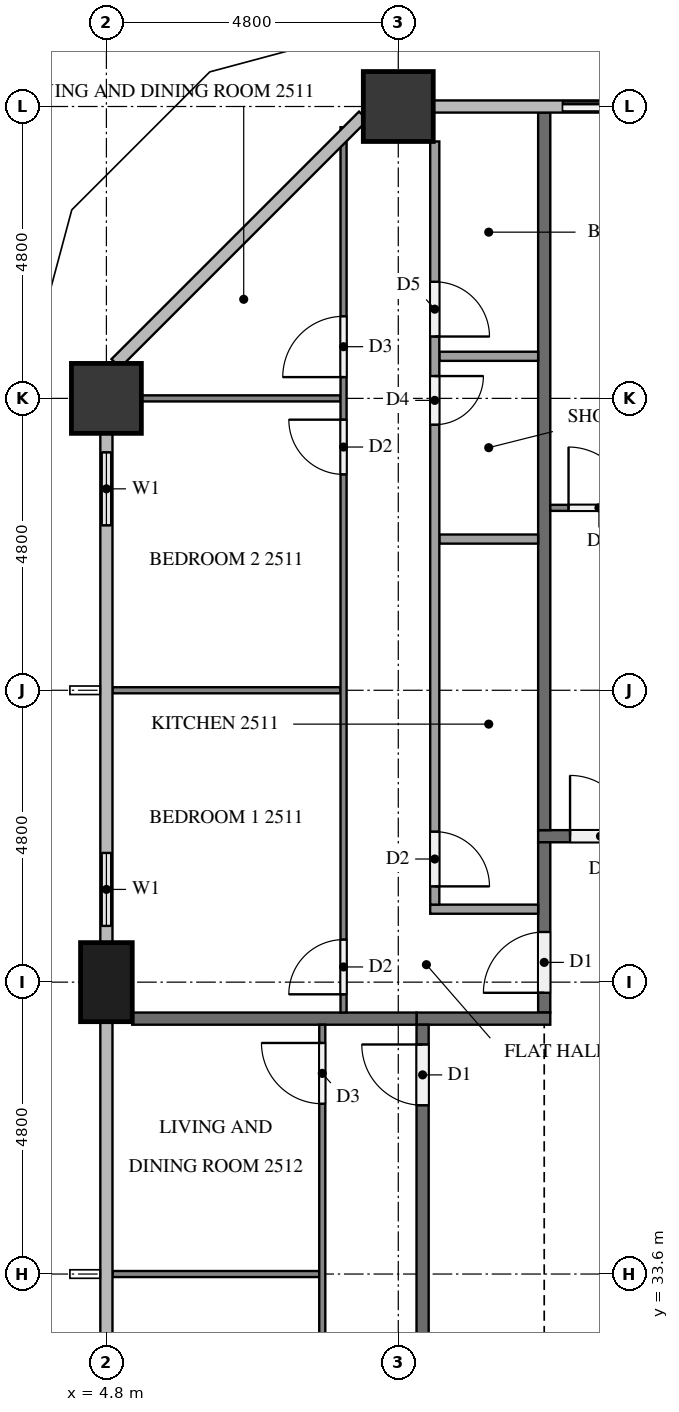
"""IFC4 building model, lengths in metres.
Left out: names, types, materials, properties, quantities, classifications, styles, units other than length and angle.
Written with IfcOpenShell. Run it as: python <this file> out.ifc"""

import sys

from ifc_helpers import new_model, si_unit, direction, frame, frame_2d, origin, origin_2d, place, context, subcontext, project, spatial, rectangle, extrude, element, fill, save


model = new_model("IFC4")
c1 = context("Model", 3, precision=1e-05, world=origin(), true_north=direction((0.0, 1.0)))
c2 = subcontext(c1, "Body", "Model", "MODEL_VIEW")
j1 = project(units=[si_unit("LENGTHUNIT", "METRE"), si_unit("PLANEANGLEUNIT", "RADIAN")], contexts=[c1])
p1 = place(None, origin())
s1 = spatial("IfcSite", under=j1, at=p1, CompositionType="ELEMENT")
p2 = place(p1, origin())
s2 = spatial("IfcBuilding", under=s1, at=p2, CompositionType="ELEMENT")
p3 = place(p2, frame((0.0, 0.0, 99.7)))
s3 = spatial("IfcBuildingStorey", under=s2, at=p3, CompositionType="ELEMENT", Elevation=99.7)
for number, where, z_axis, x_axis in (
    (1, (9.6, 52.8, 0.0), (0.0, 0.0, 1.0), (1.0, 0.0, 0.0)),
    (2, (4.8, 48.0, 0.0), (0.0, 0.0, 1.0), (1.0, 0.0, 0.0)),
):
    element("IfcColumn", number, at=place(p3, frame(where, z_axis=z_axis, x_axis=x_axis)), inside=s3, PredefinedType="COLUMN", context=c2, shape_type="SweptSolid", body=[
        extrude(rectangle(XDim=1.15, YDim=1.15, at=origin_2d()), origin(), (0.0, 0.0, 1.0), 3.2),
    ])
p4 = place(p3, frame((4.8, 38.4, 0.0), z_axis=(0.0, 0.0, 1.0), x_axis=(0.0, 1.0, 0.0)))
e3 = element("IfcColumn", 3, at=p4, inside=s3, PredefinedType="COLUMN", context=c2, shape_type="SweptSolid", body=[
    extrude(rectangle(XDim=1.3, YDim=0.85, at=origin_2d()), origin(), (0.0, 0.0, 1.0), 3.2),
])
p5 = place(p3, frame((14.4, 52.8, 0.0), z_axis=(0.0, 0.0, 1.0), x_axis=(-1.0, 0.0, 0.0)))
e4 = element("IfcWall", 4, at=p5, inside=s3, PredefinedType="SOLIDWALL", context=c2, shape_type="SweptSolid", body=[
    extrude(rectangle(XDim=2.4, YDim=0.15, at=frame_2d((1.2, 0.0))), origin(), (0.0, 0.0, 1.0), 3.2),
])
p6 = place(p5, frame((0.3, 0.0, 0.0)))
e5 = element("IfcOpeningElement", 5, at=p6, cuts=e4, PredefinedType="OPENING", context=c2, shape_type="SweptSolid", body=[
    extrude(rectangle(XDim=1.8, YDim=2.4, at=frame_2d((0.9, 1.2))), frame((0.0, 0.085, 0.0), z_axis=(0.0, -1.0, 0.0), x_axis=(1.0, 0.0, 0.0)), (0.0, 0.0, 1.0), 0.17),
])
p7 = place(p3, frame((4.8, 47.425, 0.0), z_axis=(0.0, 0.0, 1.0), x_axis=(0.0, -1.0, 0.0)))
e6 = element("IfcWall", 6, at=p7, inside=s3, PredefinedType="SOLIDWALL", context=c2, shape_type="SweptSolid", body=[
    extrude(rectangle(XDim=1.825, YDim=0.15, at=frame_2d((0.913, 0.0))), origin(), (0.0, 0.0, 1.0), 3.2),
])
p8 = place(p7, frame((0.312, 0.0, 0.9)))
e7 = element("IfcOpeningElement", 7, at=p8, cuts=e6, PredefinedType="OPENING", context=c2, shape_type="SweptSolid", body=[
    extrude(rectangle(XDim=1.2, YDim=1.4, at=frame_2d((0.6, 0.7))), frame((0.0, 0.085, 0.0), z_axis=(0.0, -1.0, 0.0), x_axis=(1.0, 0.0, 0.0)), (0.0, 0.0, 1.0), 0.17),
])
p9 = place(p3, frame((4.8, 40.8, 0.0), z_axis=(0.0, 0.0, 1.0), x_axis=(0.0, -1.0, 0.0)))
e8 = element("IfcWall", 8, at=p9, inside=s3, PredefinedType="SOLIDWALL", context=c2, shape_type="SweptSolid", body=[
    extrude(rectangle(XDim=1.75, YDim=0.15, at=frame_2d((0.875, 0.0))), origin(), (0.0, 0.0, 1.0), 3.2),
])
p10 = place(p9, frame((0.275, 0.0, 0.9)))
e9 = element("IfcOpeningElement", 9, at=p10, cuts=e8, PredefinedType="OPENING", context=c2, shape_type="SweptSolid", body=[
    extrude(rectangle(XDim=1.2, YDim=1.4, at=frame_2d((0.6, 0.7))), frame((0.0, 0.085, 0.0), z_axis=(0.0, -1.0, 0.0), x_axis=(1.0, 0.0, 0.0)), (0.0, 0.0, 1.0), 0.17),
])
p11 = place(p3, frame((11.9, 40.8, 0.0), z_axis=(0.0, 0.0, 1.0), x_axis=(1.0, 0.0, 0.0)))
e10 = element("IfcWall", 10, at=p11, inside=s3, PredefinedType="PARTITIONING", context=c2, shape_type="SweptSolid", body=[
    extrude(rectangle(XDim=38.6, YDim=0.2, at=frame_2d((19.3, 0.0))), origin(), (0.0, 0.0, 1.0), 3.2),
])
p12 = place(p11, frame((22.125, 0.0, 0.0)))
e11 = element("IfcOpeningElement", 11, at=p12, cuts=e10, PredefinedType="OPENING", context=c2, shape_type="SweptSolid", body=[
    extrude(rectangle(XDim=1.0, YDim=2.1, at=frame_2d((0.5, 1.05))), frame((0.0, 0.11, 0.0), z_axis=(0.0, -1.0, 0.0), x_axis=(1.0, 0.0, 0.0)), (0.0, 0.0, 1.0), 0.22),
])
p13 = place(p11, frame((20.275, 0.0, 0.0)))
e12 = element("IfcOpeningElement", 12, at=p13, cuts=e10, PredefinedType="OPENING", context=c2, shape_type="SweptSolid", body=[
    extrude(rectangle(XDim=1.0, YDim=2.1, at=frame_2d((0.5, 1.05))), frame((0.0, 0.11, 0.0), z_axis=(0.0, -1.0, 0.0), x_axis=(1.0, 0.0, 0.0)), (0.0, 0.0, 1.0), 0.22),
])
p14 = place(p11, frame((0.525, 0.0, 0.0)))
e13 = element("IfcOpeningElement", 13, at=p14, cuts=e10, PredefinedType="OPENING", context=c2, shape_type="SweptSolid", body=[
    extrude(rectangle(XDim=1.0, YDim=2.1, at=frame_2d((0.5, 1.05))), frame((0.0, 0.11, 0.0), z_axis=(0.0, -1.0, 0.0), x_axis=(1.0, 0.0, 0.0)), (0.0, 0.0, 1.0), 0.22),
])
p15 = place(p3, frame((12.0, 37.9, 0.0), z_axis=(0.0, 0.0, 1.0), x_axis=(0.0, 1.0, 0.0)))
e14 = element("IfcWall", 14, at=p15, inside=s3, PredefinedType="PARTITIONING", context=c2, shape_type="SweptSolid", body=[
    extrude(rectangle(XDim=2.8, YDim=0.2, at=frame_2d((1.4, 0.0))), origin(), (0.0, 0.0, 1.0), 3.2),
])
p16 = place(p15, frame((0.325, 0.0, 0.0)))
e15 = element("IfcOpeningElement", 15, at=p16, cuts=e14, PredefinedType="OPENING", context=c2, shape_type="SweptSolid", body=[
    extrude(rectangle(XDim=1.0, YDim=2.1, at=frame_2d((0.5, 1.05))), frame((0.0, 0.11, 0.0), z_axis=(0.0, -1.0, 0.0), x_axis=(1.0, 0.0, 0.0)), (0.0, 0.0, 1.0), 0.22),
])
p17 = place(p3, frame((12.1, 37.8, 0.0), z_axis=(0.0, 0.0, 1.0), x_axis=(-1.0, 0.0, 0.0)))
e16 = element("IfcWall", 16, at=p17, inside=s3, PredefinedType="PARTITIONING", context=c2, shape_type="SweptSolid", body=[
    extrude(rectangle(XDim=2.2, YDim=0.2, at=frame_2d((1.1, 0.0))), origin(), (0.0, 0.0, 1.0), 3.2),
])
p18 = place(p3, frame((10.0, 15.1, 0.0), z_axis=(0.0, 0.0, 1.0), x_axis=(0.0, 1.0, 0.0)))
e17 = element("IfcWall", 17, at=p18, inside=s3, PredefinedType="PARTITIONING", context=c2, shape_type="SweptSolid", body=[
    extrude(rectangle(XDim=22.6, YDim=0.2, at=frame_2d((11.3, 0.0))), origin(), (0.0, 0.0, 1.0), 3.2),
])
p19 = place(p18, frame((21.275, 0.0, 0.0)))
e18 = element("IfcOpeningElement", 18, at=p19, cuts=e17, PredefinedType="OPENING", context=c2, shape_type="SweptSolid", body=[
    extrude(rectangle(XDim=1.0, YDim=2.1, at=frame_2d((0.5, 1.05))), frame((0.0, 0.11, 0.0), z_axis=(0.0, -1.0, 0.0), x_axis=(1.0, 0.0, 0.0)), (0.0, 0.0, 1.0), 0.22),
])
p20 = place(p18, frame((7.475, 0.0, 0.0)))
e19 = element("IfcOpeningElement", 19, at=p20, cuts=e17, PredefinedType="OPENING", context=c2, shape_type="SweptSolid", body=[
    extrude(rectangle(XDim=1.0, YDim=2.1, at=frame_2d((0.5, 1.05))), frame((0.0, 0.11, 0.0), z_axis=(0.0, -1.0, 0.0), x_axis=(1.0, 0.0, 0.0)), (0.0, 0.0, 1.0), 0.22),
])
p21 = place(p3, frame((12.0, 52.7, 0.0), z_axis=(0.0, 0.0, 1.0), x_axis=(0.0, -1.0, 0.0)))
e20 = element("IfcWall", 20, at=p21, inside=s3, PredefinedType="PARTITIONING", context=c2, shape_type="SweptSolid", body=[
    extrude(rectangle(XDim=11.8, YDim=0.2, at=frame_2d((5.9, 0.0))), origin(), (0.0, 0.0, 1.0), 3.2),
])
p22 = place(p3, frame((5.225, 37.8, 0.0), z_axis=(0.0, 0.0, 1.0), x_axis=(1.0, 0.0, 0.0)))
e21 = element("IfcWall", 21, at=p22, inside=s3, PredefinedType="PARTITIONING", context=c2, shape_type="SweptSolid", body=[
    extrude(rectangle(XDim=4.675, YDim=0.2, at=frame_2d((2.337, 0.0))), origin(), (0.0, 0.0, 1.0), 3.2),
])
p23 = place(p3, frame((12.1, 46.2, 0.0), z_axis=(0.0, 0.0, 1.0), x_axis=(1.0, 0.0, 0.0)))
e22 = element("IfcWall", 22, at=p23, inside=s3, PredefinedType="PARTITIONING", context=c2, shape_type="SweptSolid", body=[
    extrude(rectangle(XDim=9.4, YDim=0.1, at=frame_2d((4.7, 0.0))), origin(), (0.0, 0.0, 1.0), 3.2),
])
p24 = place(p23, frame((0.3, 0.0, 0.0)))
e23 = element("IfcOpeningElement", 23, at=p24, cuts=e22, PredefinedType="OPENING", context=c2, shape_type="SweptSolid", body=[
    extrude(rectangle(XDim=1.0, YDim=2.1, at=frame_2d((0.5, 1.05))), frame((0.0, 0.06, 0.0), z_axis=(0.0, -1.0, 0.0), x_axis=(1.0, 0.0, 0.0)), (0.0, 0.0, 1.0), 0.12),
])
p25 = place(p23, frame((8.2, 0.0, 0.0)))
e24 = element("IfcOpeningElement", 24, at=p25, cuts=e22, PredefinedType="OPENING", context=c2, shape_type="SweptSolid", body=[
    extrude(rectangle(XDim=0.9, YDim=2.1, at=frame_2d((0.45, 1.05))), frame((0.0, 0.06, 0.0), z_axis=(0.0, -1.0, 0.0), x_axis=(1.0, 0.0, 0.0)), (0.0, 0.0, 1.0), 0.12),
])
p26 = place(p3, frame((8.65, 43.2, 0.0), z_axis=(0.0, 0.0, 1.0), x_axis=(-1.0, 0.0, 0.0)))
e25 = element("IfcWall", 25, at=p26, inside=s3, PredefinedType="PARTITIONING", context=c2, shape_type="SweptSolid", body=[
    extrude(rectangle(XDim=3.75, YDim=0.1, at=frame_2d((1.875, 0.0))), origin(), (0.0, 0.0, 1.0), 3.2),
])
p27 = place(p3, frame((8.65, 48.0, 0.0), z_axis=(0.0, 0.0, 1.0), x_axis=(-1.0, 0.0, 0.0)))
e26 = element("IfcWall", 26, at=p27, inside=s3, PredefinedType="PARTITIONING", context=c2, shape_type="SweptSolid", body=[
    extrude(rectangle(XDim=3.275, YDim=0.1, at=frame_2d((1.637, 0.0))), origin(), (0.0, 0.0, 1.0), 3.2),
])
p28 = place(p3, frame((8.7, 37.9, 0.0), z_axis=(0.0, 0.0, 1.0), x_axis=(0.0, 1.0, 0.0)))
e27 = element("IfcWall", 27, at=p28, inside=s3, PredefinedType="PARTITIONING", context=c2, shape_type="SweptSolid", body=[
    extrude(rectangle(XDim=14.559, YDim=0.1, at=frame_2d((7.279, 0.0))), origin(), (0.0, 0.0, 1.0), 3.2),
])
p29 = place(p28, frame((0.3, 0.0, 0.0)))
e28 = element("IfcOpeningElement", 28, at=p29, cuts=e27, PredefinedType="OPENING", context=c2, shape_type="SweptSolid", body=[
    extrude(rectangle(XDim=0.9, YDim=2.1, at=frame_2d((0.45, 1.05))), frame((0.0, 0.06, 0.0), z_axis=(0.0, -1.0, 0.0), x_axis=(1.0, 0.0, 0.0)), (0.0, 0.0, 1.0), 0.12),
])
p30 = place(p28, frame((8.85, 0.0, 0.0)))
e29 = element("IfcOpeningElement", 29, at=p30, cuts=e27, PredefinedType="OPENING", context=c2, shape_type="SweptSolid", body=[
    extrude(rectangle(XDim=0.9, YDim=2.1, at=frame_2d((0.45, 1.05))), frame((0.0, 0.06, 0.0), z_axis=(0.0, -1.0, 0.0), x_axis=(1.0, 0.0, 0.0)), (0.0, 0.0, 1.0), 0.12),
])
p31 = place(p28, frame((10.45, 0.0, 0.0)))
e30 = element("IfcOpeningElement", 30, at=p31, cuts=e27, PredefinedType="OPENING", context=c2, shape_type="SweptSolid", body=[
    extrude(rectangle(XDim=1.0, YDim=2.1, at=frame_2d((0.5, 1.05))), frame((0.0, 0.06, 0.0), z_axis=(0.0, -1.0, 0.0), x_axis=(1.0, 0.0, 0.0)), (0.0, 0.0, 1.0), 0.12),
])
for number, where, z_axis, x_axis in (
    (31, (11.9, 45.687, 0.0), (0.0, 0.0, 1.0), (-1.0, 0.0, 0.0)),
    (32, (11.9, 48.692, 0.0), (0.0, 0.0, 1.0), (-1.0, 0.0, 0.0)),
):
    element("IfcWall", number, at=place(p3, frame(where, z_axis=z_axis, x_axis=x_axis)), inside=s3, PredefinedType="PARTITIONING", context=c2, shape_type="SweptSolid", body=[
        extrude(rectangle(XDim=1.625, YDim=0.15, at=frame_2d((0.812, 0.0))), origin(), (0.0, 0.0, 1.0), 3.2),
    ])
p32 = place(p3, frame((11.9, 39.6, 0.0), z_axis=(0.0, 0.0, 1.0), x_axis=(-1.0, 0.0, 0.0)))
e33 = element("IfcWall", 33, at=p32, inside=s3, PredefinedType="PARTITIONING", context=c2, shape_type="SweptSolid", body=[
    extrude(rectangle(XDim=1.775, YDim=0.15, at=frame_2d((0.887, 0.0))), origin(), (0.0, 0.0, 1.0), 3.2),
])
p33 = place(p3, frame((10.2, 52.225, 0.0), z_axis=(0.0, 0.0, 1.0), x_axis=(0.0, -1.0, 0.0)))
e34 = element("IfcWall", 34, at=p33, inside=s3, PredefinedType="PARTITIONING", context=c2, shape_type="SweptSolid", body=[
    extrude(rectangle(XDim=12.55, YDim=0.15, at=frame_2d((6.275, 0.0))), origin(), (0.0, 0.0, 1.0), 3.2),
])
p34 = place(p33, frame((11.35, 0.0, 0.0)))
e35 = element("IfcOpeningElement", 35, at=p34, cuts=e34, PredefinedType="OPENING", context=c2, shape_type="SweptSolid", body=[
    extrude(rectangle(XDim=0.9, YDim=2.1, at=frame_2d((0.45, 1.05))), frame((0.0, 0.085, 0.0), z_axis=(0.0, -1.0, 0.0), x_axis=(1.0, 0.0, 0.0)), (0.0, 0.0, 1.0), 0.17),
])
p35 = place(p33, frame((3.858, 0.0, 0.0)))
e36 = element("IfcOpeningElement", 36, at=p35, cuts=e34, PredefinedType="OPENING", context=c2, shape_type="SweptSolid", body=[
    extrude(rectangle(XDim=0.8, YDim=2.1, at=frame_2d((0.4, 1.05))), frame((0.0, 0.085, 0.0), z_axis=(0.0, -1.0, 0.0), x_axis=(1.0, 0.0, 0.0)), (0.0, 0.0, 1.0), 0.17),
])
p36 = place(p33, frame((2.308, 0.0, 0.0)))
e37 = element("IfcOpeningElement", 37, at=p36, cuts=e34, PredefinedType="OPENING", context=c2, shape_type="SweptSolid", body=[
    extrude(rectangle(XDim=0.9, YDim=2.1, at=frame_2d((0.45, 1.05))), frame((0.0, 0.085, 0.0), z_axis=(0.0, -1.0, 0.0), x_axis=(1.0, 0.0, 0.0)), (0.0, 0.0, 1.0), 0.17),
])
p37 = place(p3, frame((8.3, 33.6, 0.0), z_axis=(0.0, 0.0, 1.0), x_axis=(-1.0, 0.0, 0.0)))
e38 = element("IfcWall", 38, at=p37, inside=s3, PredefinedType="PARTITIONING", context=c2, shape_type="SweptSolid", body=[
    extrude(rectangle(XDim=3.4, YDim=0.1, at=frame_2d((1.7, 0.0))), origin(), (0.0, 0.0, 1.0), 3.2),
])
p38 = place(p3, frame((8.35, 24.1, 0.0), z_axis=(0.0, 0.0, 1.0), x_axis=(0.0, 1.0, 0.0)))
e39 = element("IfcWall", 39, at=p38, inside=s3, PredefinedType="PARTITIONING", context=c2, shape_type="SweptSolid", body=[
    extrude(rectangle(XDim=13.6, YDim=0.1, at=frame_2d((6.8, 0.0))), origin(), (0.0, 0.0, 1.0), 3.2),
])
p39 = place(p38, frame((12.3, 0.0, 0.0)))
e40 = element("IfcOpeningElement", 40, at=p39, cuts=e39, PredefinedType="OPENING", context=c2, shape_type="SweptSolid", body=[
    extrude(rectangle(XDim=1.0, YDim=2.1, at=frame_2d((0.5, 1.05))), frame((0.0, 0.06, 0.0), z_axis=(0.0, -1.0, 0.0), x_axis=(1.0, 0.0, 0.0)), (0.0, 0.0, 1.0), 0.12),
])
p40 = place(p38, frame((5.05, 0.0, 0.0)))
e41 = element("IfcOpeningElement", 41, at=p40, cuts=e39, PredefinedType="OPENING", context=c2, shape_type="SweptSolid", body=[
    extrude(rectangle(XDim=0.9, YDim=2.1, at=frame_2d((0.45, 1.05))), frame((0.0, 0.06, 0.0), z_axis=(0.0, -1.0, 0.0), x_axis=(1.0, 0.0, 0.0)), (0.0, 0.0, 1.0), 0.12),
])
p41 = place(p38, frame((3.55, 0.0, 0.0)))
e42 = element("IfcOpeningElement", 42, at=p41, cuts=e39, PredefinedType="OPENING", context=c2, shape_type="SweptSolid", body=[
    extrude(rectangle(XDim=0.8, YDim=2.1, at=frame_2d((0.4, 1.05))), frame((0.0, 0.06, 0.0), z_axis=(0.0, -1.0, 0.0), x_axis=(1.0, 0.0, 0.0)), (0.0, 0.0, 1.0), 0.12),
])
p42 = place(p38, frame((0.3, 0.0, 0.0)))
e43 = element("IfcOpeningElement", 43, at=p42, cuts=e39, PredefinedType="OPENING", context=c2, shape_type="SweptSolid", body=[
    extrude(rectangle(XDim=0.9, YDim=2.1, at=frame_2d((0.45, 1.05))), frame((0.0, 0.06, 0.0), z_axis=(0.0, -1.0, 0.0), x_axis=(1.0, 0.0, 0.0)), (0.0, 0.0, 1.0), 0.12),
])
p43 = place(p6, origin())
e44 = element("IfcDoor", 44, at=p43, inside=s3, OperationType="SLIDING_TO_RIGHT", PredefinedType="DOOR", context=c2, shape_type="SweptSolid", body=[
    extrude(rectangle(XDim=1.8, YDim=2.4, at=frame_2d((0.9, 1.2))), frame((0.0, 0.025, 0.0), z_axis=(0.0, -1.0, 0.0), x_axis=(1.0, 0.0, 0.0)), (0.0, 0.0, 1.0), 0.05),
])
fill(e5, e44)
p44 = place(p8, origin())
e45 = element("IfcWindow", 45, at=p44, inside=s3, PartitioningType="SINGLE_PANEL", PredefinedType="WINDOW", context=c2, shape_type="SweptSolid", body=[
    extrude(rectangle(XDim=1.2, YDim=1.4, at=frame_2d((0.6, 0.7))), frame((0.0, 0.03, 0.0), z_axis=(0.0, -1.0, 0.0), x_axis=(1.0, 0.0, 0.0)), (0.0, 0.0, 1.0), 0.06),
])
fill(e7, e45)
p45 = place(p10, origin())
e46 = element("IfcWindow", 46, at=p45, inside=s3, PartitioningType="SINGLE_PANEL", PredefinedType="WINDOW", context=c2, shape_type="SweptSolid", body=[
    extrude(rectangle(XDim=1.2, YDim=1.4, at=frame_2d((0.6, 0.7))), frame((0.0, 0.03, 0.0), z_axis=(0.0, -1.0, 0.0), x_axis=(1.0, 0.0, 0.0)), (0.0, 0.0, 1.0), 0.06),
])
fill(e9, e46)
p46 = place(p14, origin())
e47 = element("IfcDoor", 47, at=p46, inside=s3, OperationType="SINGLE_SWING_LEFT", PredefinedType="DOOR", context=c2, shape_type="SweptSolid", body=[
    extrude(rectangle(XDim=1.0, YDim=2.1, at=frame_2d((0.5, 1.05))), frame((0.0, 0.025, 0.0), z_axis=(0.0, -1.0, 0.0), x_axis=(1.0, 0.0, 0.0)), (0.0, 0.0, 1.0), 0.05),
])
fill(e13, e47)
p47 = place(p16, origin())
e48 = element("IfcDoor", 48, at=p47, inside=s3, OperationType="SINGLE_SWING_LEFT", PredefinedType="DOOR", context=c2, shape_type="SweptSolid", body=[
    extrude(rectangle(XDim=1.0, YDim=2.1, at=frame_2d((0.5, 1.05))), frame((0.0, 0.025, 0.0), z_axis=(0.0, -1.0, 0.0), x_axis=(1.0, 0.0, 0.0)), (0.0, 0.0, 1.0), 0.05),
])
fill(e15, e48)
p48 = place(p19, origin())
e49 = element("IfcDoor", 49, at=p48, inside=s3, OperationType="SINGLE_SWING_RIGHT", PredefinedType="DOOR", context=c2, shape_type="SweptSolid", body=[
    extrude(rectangle(XDim=1.0, YDim=2.1, at=frame_2d((0.5, 1.05))), frame((0.0, 0.025, 0.0), z_axis=(0.0, -1.0, 0.0), x_axis=(1.0, 0.0, 0.0)), (0.0, 0.0, 1.0), 0.05),
])
fill(e18, e49)
p49 = place(p24, origin())
e50 = element("IfcDoor", 50, at=p49, inside=s3, OperationType="SINGLE_SWING_LEFT", PredefinedType="DOOR", context=c2, shape_type="SweptSolid", body=[
    extrude(rectangle(XDim=1.0, YDim=2.1, at=frame_2d((0.5, 1.05))), frame((0.0, 0.025, 0.0), z_axis=(0.0, -1.0, 0.0), x_axis=(1.0, 0.0, 0.0)), (0.0, 0.0, 1.0), 0.05),
])
fill(e23, e50)
p50 = place(p29, origin())
e51 = element("IfcDoor", 51, at=p50, inside=s3, OperationType="SINGLE_SWING_LEFT", PredefinedType="DOOR", context=c2, shape_type="SweptSolid", body=[
    extrude(rectangle(XDim=0.9, YDim=2.1, at=frame_2d((0.45, 1.05))), frame((0.0, 0.025, 0.0), z_axis=(0.0, -1.0, 0.0), x_axis=(1.0, 0.0, 0.0)), (0.0, 0.0, 1.0), 0.05),
])
fill(e28, e51)
p51 = place(p30, origin())
e52 = element("IfcDoor", 52, at=p51, inside=s3, OperationType="SINGLE_SWING_RIGHT", PredefinedType="DOOR", context=c2, shape_type="SweptSolid", body=[
    extrude(rectangle(XDim=0.9, YDim=2.1, at=frame_2d((0.45, 1.05))), frame((0.0, 0.025, 0.0), z_axis=(0.0, -1.0, 0.0), x_axis=(1.0, 0.0, 0.0)), (0.0, 0.0, 1.0), 0.05),
])
fill(e29, e52)
p52 = place(p31, origin())
e53 = element("IfcDoor", 53, at=p52, inside=s3, OperationType="SINGLE_SWING_LEFT", PredefinedType="DOOR", context=c2, shape_type="SweptSolid", body=[
    extrude(rectangle(XDim=1.0, YDim=2.1, at=frame_2d((0.5, 1.05))), frame((0.0, 0.025, 0.0), z_axis=(0.0, -1.0, 0.0), x_axis=(1.0, 0.0, 0.0)), (0.0, 0.0, 1.0), 0.05),
])
fill(e30, e53)
p53 = place(p34, origin())
e54 = element("IfcDoor", 54, at=p53, inside=s3, OperationType="SINGLE_SWING_RIGHT", PredefinedType="DOOR", context=c2, shape_type="SweptSolid", body=[
    extrude(rectangle(XDim=0.9, YDim=2.1, at=frame_2d((0.45, 1.05))), frame((0.0, 0.025, 0.0), z_axis=(0.0, -1.0, 0.0), x_axis=(1.0, 0.0, 0.0)), (0.0, 0.0, 1.0), 0.05),
])
fill(e35, e54)
p54 = place(p35, origin())
e55 = element("IfcDoor", 55, at=p54, inside=s3, OperationType="SINGLE_SWING_LEFT", PredefinedType="DOOR", context=c2, shape_type="SweptSolid", body=[
    extrude(rectangle(XDim=0.8, YDim=2.1, at=frame_2d((0.4, 1.05))), frame((0.0, 0.025, 0.0), z_axis=(0.0, -1.0, 0.0), x_axis=(1.0, 0.0, 0.0)), (0.0, 0.0, 1.0), 0.05),
])
fill(e36, e55)
p55 = place(p36, origin())
e56 = element("IfcDoor", 56, at=p55, inside=s3, OperationType="SINGLE_SWING_RIGHT", PredefinedType="DOOR", context=c2, shape_type="SweptSolid", body=[
    extrude(rectangle(XDim=0.9, YDim=2.1, at=frame_2d((0.45, 1.05))), frame((0.0, 0.025, 0.0), z_axis=(0.0, -1.0, 0.0), x_axis=(1.0, 0.0, 0.0)), (0.0, 0.0, 1.0), 0.05),
])
fill(e37, e56)
p56 = place(p39, origin())
e57 = element("IfcDoor", 57, at=p56, inside=s3, OperationType="SINGLE_SWING_RIGHT", PredefinedType="DOOR", context=c2, shape_type="SweptSolid", body=[
    extrude(rectangle(XDim=1.0, YDim=2.1, at=frame_2d((0.5, 1.05))), frame((0.0, 0.025, 0.0), z_axis=(0.0, -1.0, 0.0), x_axis=(1.0, 0.0, 0.0)), (0.0, 0.0, 1.0), 0.05),
])
fill(e40, e57)
save(model, sys.argv[1])
